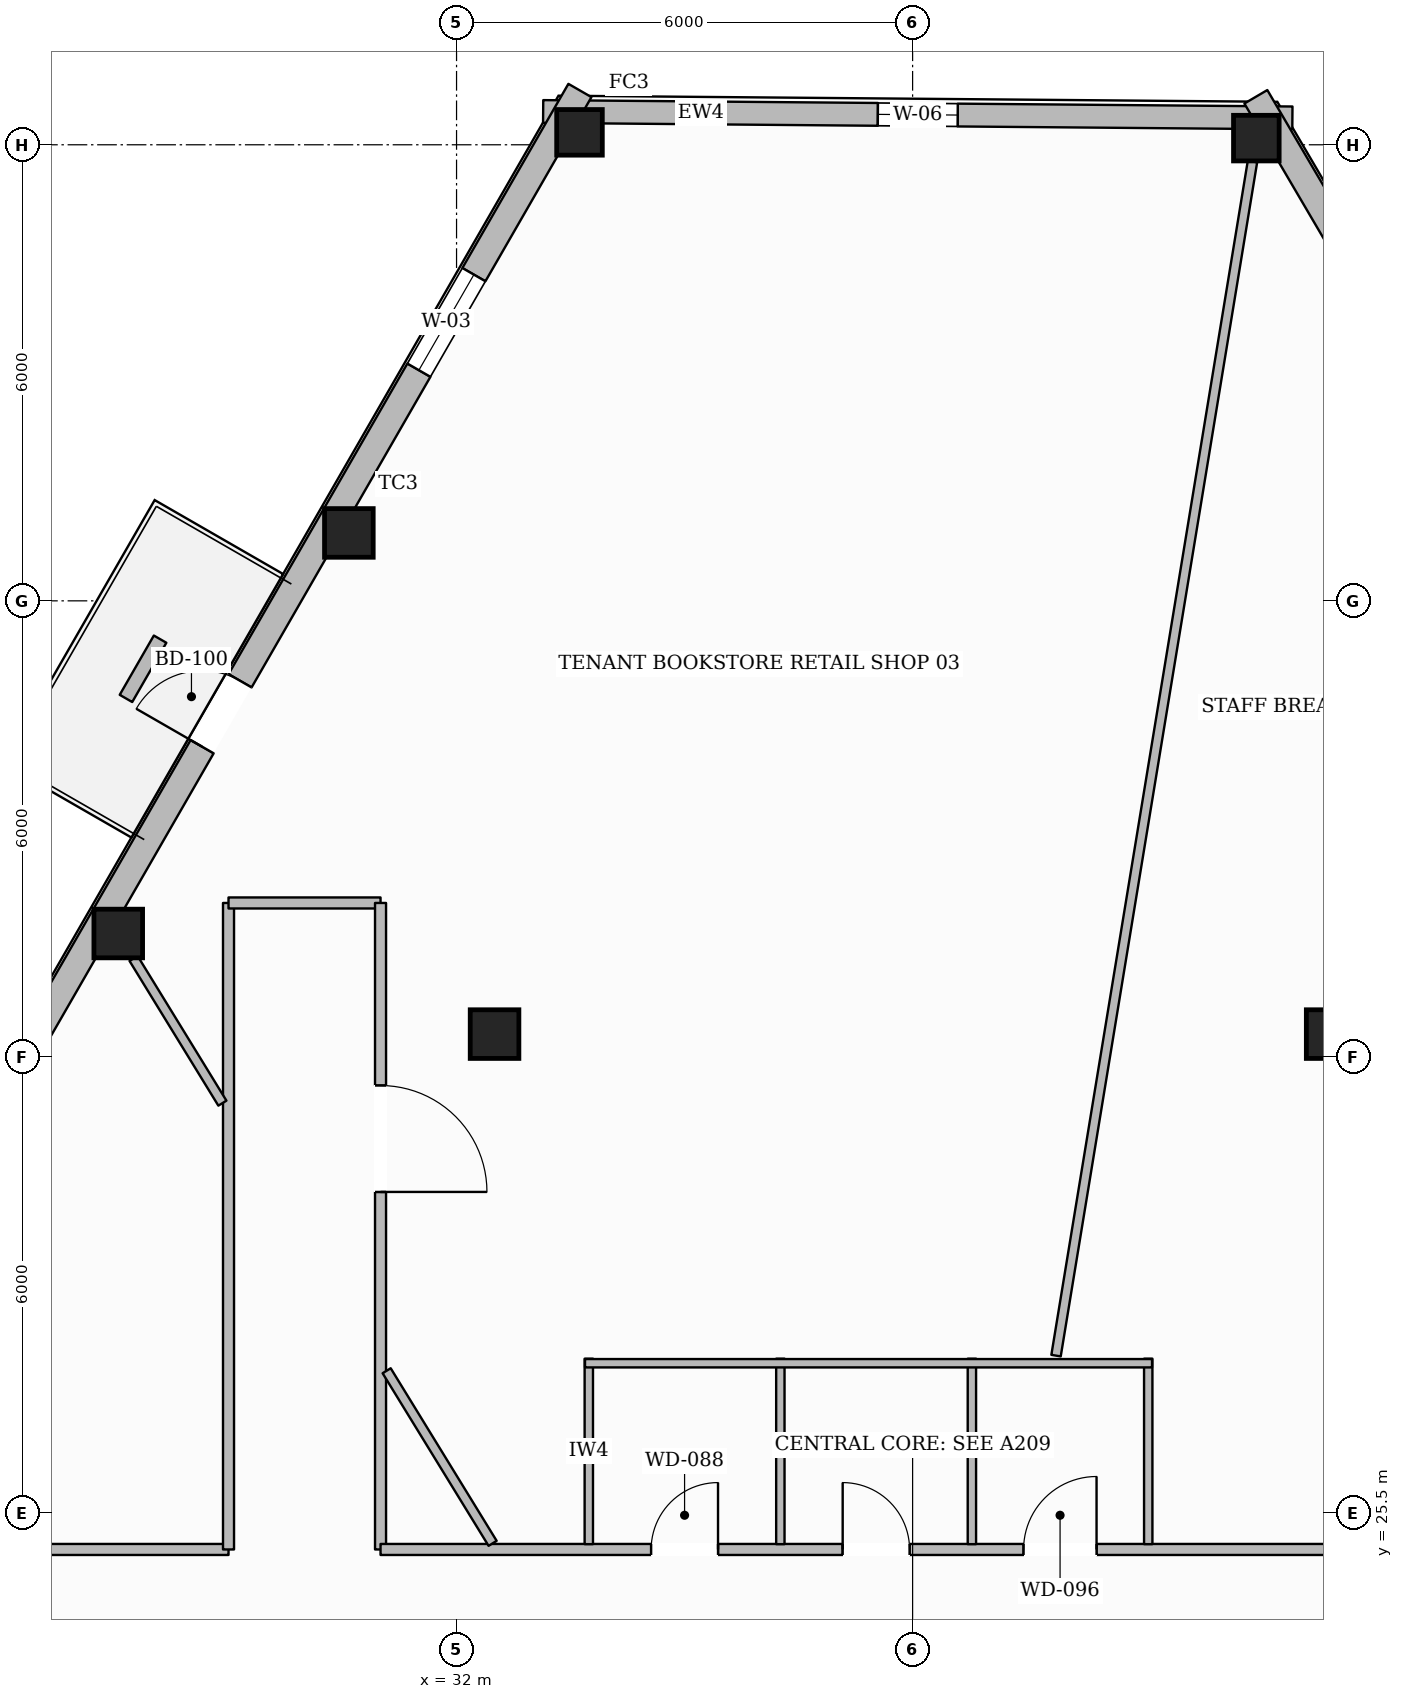
"""IFC4 building model, lengths in metres.
Left out: names, types, materials, properties, quantities, classifications, styles, units other than length and angle.
Written with IfcOpenShell. Run it as: python <this file> out.ifc"""

import sys

from ifc_helpers import new_model, si_unit, direction, frame, frame_2d, origin, origin_2d, place, context, subcontext, project, spatial, rectangle, hollow_rectangle, extrude, element, fill, save


model = new_model("IFC4")
c1 = context("Model", 3, precision=1e-05, world=origin(), true_north=direction((0.0, 1.0)))
c2 = subcontext(c1, "Body", "Model", "MODEL_VIEW")
j1 = project(units=[si_unit("LENGTHUNIT", "METRE"), si_unit("PLANEANGLEUNIT", "RADIAN")], contexts=[c1])
p1 = place(None, origin())
s1 = spatial("IfcSite", under=j1, at=p1, CompositionType="ELEMENT")
p2 = place(p1, origin())
s2 = spatial("IfcBuilding", under=s1, at=p2, CompositionType="ELEMENT")
p3 = place(p2, frame((0.0, 0.0, 191.95)))
s3 = spatial("IfcBuildingStorey", under=s2, at=p3, CompositionType="ELEMENT", Elevation=191.95)
p4 = place(p3, frame((33.617, 43.663, 0.0), z_axis=(0.0, 0.0, 1.0), x_axis=(1.0, 0.0, 0.0)))
e1 = element("IfcColumn", 1, at=p4, inside=s3, PredefinedType="COLUMN", context=c2, shape_type="SweptSolid", body=[
    extrude(hollow_rectangle(XDim=0.6, YDim=0.6, WallThickness=0.028, at=origin_2d()), origin(), (0.0, 0.0, 1.0), 3.6),
])
for number, where, z_axis, x_axis in (
    (2, (30.583, 38.393, 0.0), (0.0, 0.0, 1.0), (1.0, 0.0, 0.0)),
    (3, (27.549, 33.123, 0.0), (0.0, 0.0, 1.0), (1.0, 0.0, 0.0)),
):
    element("IfcColumn", number, at=place(p3, frame(where, z_axis=z_axis, x_axis=x_axis)), inside=s3, PredefinedType="COLUMN", context=c2, shape_type="SweptSolid", body=[
        extrude(hollow_rectangle(XDim=0.64, YDim=0.64, WallThickness=0.028, at=origin_2d()), origin(), (0.0, 0.0, 1.0), 3.6),
    ])
p5 = place(p3, frame((42.522, 43.587, 0.0), z_axis=(0.0, 0.0, 1.0), x_axis=(1.0, 0.0, 0.0)))
e4 = element("IfcColumn", 4, at=p5, inside=s3, PredefinedType="COLUMN", context=c2, shape_type="SweptSolid", body=[
    extrude(hollow_rectangle(XDim=0.6, YDim=0.6, WallThickness=0.028, at=origin_2d()), origin(), (0.0, 0.0, 1.0), 3.6),
])
for number, where, z_axis, x_axis in (
    (5, (32.5, 31.8, 0.0), (0.0, 0.0, 1.0), (1.0, 0.0, 0.0)),
    (6, (43.5, 31.8, 0.0), (0.0, 0.0, 1.0), (1.0, 0.0, 0.0)),
):
    element("IfcColumn", number, at=place(p3, frame(where, z_axis=z_axis, x_axis=x_axis)), inside=s3, PredefinedType="COLUMN", context=c2, shape_type="SweptSolid", body=[
        extrude(hollow_rectangle(XDim=0.64, YDim=0.64, WallThickness=0.028, at=origin_2d()), origin(), (0.0, 0.0, 1.0), 3.6),
    ])
p6 = place(p3, frame((33.139, 43.938, 0.0), z_axis=(0.0, 0.0, 1.0), x_axis=(0.999963705721, -0.008519814607, 0.0)))
e7 = element("IfcWall", 7, at=p6, inside=s3, PredefinedType="STANDARD", context=c2, shape_type="SweptSolid", body=[
    extrude(rectangle(XDim=9.857, YDim=0.3, at=frame_2d((4.929, 0.0))), origin(), (0.0, 0.0, 1.0), 3.132),
])
p7 = place(p6, frame((4.404, 0.0, 0.65)))
e8 = element("IfcOpeningElement", 8, at=p7, cuts=e7, PredefinedType="OPENING", context=c2, shape_type="SweptSolid", body=[
    extrude(rectangle(XDim=1.05, YDim=1.7, at=frame_2d((0.525, 0.85))), frame((0.0, 0.16, 0.0), z_axis=(0.0, -1.0, 0.0), x_axis=(1.0, 0.0, 0.0)), (0.0, 0.0, 1.0), 0.32),
])
p8 = place(p3, frame((14.94, 11.763, 0.0), z_axis=(0.0, 0.0, 1.0), x_axis=(0.498943522518, 0.866634502739, 0.0)))
e9 = element("IfcWall", 9, at=p8, inside=s3, PredefinedType="STANDARD", context=c2, shape_type="SweptSolid", body=[
    extrude(rectangle(XDim=37.445, YDim=0.35, at=frame_2d((18.723, 0.0))), origin(), (0.0, 0.0, 1.0), 3.132),
])
p9 = place(p8, frame((27.484, 0.0, 0.0)))
e10 = element("IfcOpeningElement", 10, at=p9, cuts=e9, PredefinedType="OPENING", context=c2, shape_type="SweptSolid", body=[
    extrude(rectangle(XDim=1.0, YDim=2.2, at=frame_2d((0.5, 1.1))), frame((0.0, 0.185, 0.0), z_axis=(0.0, -1.0, 0.0), x_axis=(1.0, 0.0, 0.0)), (0.0, 0.0, 1.0), 0.37),
])
p10 = place(p8, frame((33.2, 0.0, 0.65)))
e11 = element("IfcOpeningElement", 11, at=p10, cuts=e9, PredefinedType="OPENING", context=c2, shape_type="SweptSolid", body=[
    extrude(rectangle(XDim=1.45, YDim=1.75, at=frame_2d((0.725, 0.875))), frame((0.0, 0.185, 0.0), z_axis=(0.0, -1.0, 0.0), x_axis=(1.0, 0.0, 0.0)), (0.0, 0.0, 1.0), 0.37),
])
p11 = place(p8, frame((21.038, 0.0, 0.65)))
e12 = element("IfcOpeningElement", 12, at=p11, cuts=e9, PredefinedType="OPENING", context=c2, shape_type="SweptSolid", body=[
    extrude(rectangle(XDim=1.45, YDim=1.75, at=frame_2d((0.725, 0.875))), frame((0.0, 0.185, 0.0), z_axis=(0.0, -1.0, 0.0), x_axis=(1.0, 0.0, 0.0)), (0.0, 0.0, 1.0), 0.37),
])
p12 = place(p8, frame((8.875, 0.0, 0.65)))
e13 = element("IfcOpeningElement", 13, at=p12, cuts=e9, PredefinedType="OPENING", context=c2, shape_type="SweptSolid", body=[
    extrude(rectangle(XDim=1.45, YDim=1.75, at=frame_2d((0.725, 0.875))), frame((0.0, 0.185, 0.0), z_axis=(0.0, -1.0, 0.0), x_axis=(1.0, 0.0, 0.0)), (0.0, 0.0, 1.0), 0.37),
])
p13 = place(p8, frame((2.795, 0.0, 0.65)))
e14 = element("IfcOpeningElement", 14, at=p13, cuts=e9, PredefinedType="OPENING", context=c2, shape_type="SweptSolid", body=[
    extrude(rectangle(XDim=1.45, YDim=1.75, at=frame_2d((0.725, 0.875))), frame((0.0, 0.185, 0.0), z_axis=(0.0, -1.0, 0.0), x_axis=(1.0, 0.0, 0.0)), (0.0, 0.0, 1.0), 0.37),
])
p14 = place(p3, frame((42.516, 44.131, 0.0), z_axis=(0.0, 0.0, 1.0), x_axis=(0.506310158323, -0.862351450152, 0.0)))
e15 = element("IfcWall", 15, at=p14, inside=s3, PredefinedType="STANDARD", context=c2, shape_type="SweptSolid", body=[
    extrude(rectangle(XDim=38.0, YDim=0.35, at=frame_2d((19.0, 0.0))), origin(), (0.0, 0.0, 1.0), 3.132),
])
p15 = place(p14, frame((33.708, 0.0, 0.65)))
e16 = element("IfcOpeningElement", 16, at=p15, cuts=e15, PredefinedType="OPENING", context=c2, shape_type="SweptSolid", body=[
    extrude(rectangle(XDim=1.45, YDim=1.75, at=frame_2d((0.725, 0.875))), frame((0.0, 0.185, 0.0), z_axis=(0.0, -1.0, 0.0), x_axis=(1.0, 0.0, 0.0)), (0.0, 0.0, 1.0), 0.37),
])
p16 = place(p14, frame((27.534, 0.0, 0.65)))
e17 = element("IfcOpeningElement", 17, at=p16, cuts=e15, PredefinedType="OPENING", context=c2, shape_type="SweptSolid", body=[
    extrude(rectangle(XDim=1.45, YDim=1.75, at=frame_2d((0.725, 0.875))), frame((0.0, 0.185, 0.0), z_axis=(0.0, -1.0, 0.0), x_axis=(1.0, 0.0, 0.0)), (0.0, 0.0, 1.0), 0.37),
])
p17 = place(p14, frame((21.359, 0.0, 0.65)))
e18 = element("IfcOpeningElement", 18, at=p17, cuts=e15, PredefinedType="OPENING", context=c2, shape_type="SweptSolid", body=[
    extrude(rectangle(XDim=1.45, YDim=1.75, at=frame_2d((0.725, 0.875))), frame((0.0, 0.185, 0.0), z_axis=(0.0, -1.0, 0.0), x_axis=(1.0, 0.0, 0.0)), (0.0, 0.0, 1.0), 0.37),
])
p18 = place(p14, frame((9.009, 0.0, 0.65)))
e19 = element("IfcOpeningElement", 19, at=p18, cuts=e15, PredefinedType="OPENING", context=c2, shape_type="SweptSolid", body=[
    extrude(rectangle(XDim=1.45, YDim=1.75, at=frame_2d((0.725, 0.875))), frame((0.0, 0.185, 0.0), z_axis=(0.0, -1.0, 0.0), x_axis=(1.0, 0.0, 0.0)), (0.0, 0.0, 1.0), 0.37),
])
p19 = place(p14, frame((2.834, 0.0, 0.65)))
e20 = element("IfcOpeningElement", 20, at=p19, cuts=e15, PredefinedType="OPENING", context=c2, shape_type="SweptSolid", body=[
    extrude(rectangle(XDim=1.45, YDim=1.75, at=frame_2d((0.725, 0.875))), frame((0.0, 0.185, 0.0), z_axis=(0.0, -1.0, 0.0), x_axis=(1.0, 0.0, 0.0)), (0.0, 0.0, 1.0), 0.37),
])
p20 = place(p3, frame((28.1, 36.996, 0.0), z_axis=(0.0, 0.0, 1.0), x_axis=(-0.499057033185, -0.866569141862, 0.0)))
e21 = element("IfcWall", 21, at=p20, inside=s3, PredefinedType="USERDEFINED", context=c2, shape_type="SweptSolid", body=[
    extrude(rectangle(XDim=0.9, YDim=0.19, at=frame_2d((0.45, 0.0))), origin(), (0.0, 0.0, 1.0), 0.5),
])
p21 = place(p3, frame((26.06, 25.02, 0.0), z_axis=(0.0, 0.0, 1.0), x_axis=(1.0, 0.0, 0.0)))
e22 = element("IfcWall", 22, at=p21, inside=s3, PredefinedType="PARTITIONING", context=c2, shape_type="SweptSolid", body=[
    extrude(rectangle(XDim=2.94, YDim=0.145, at=frame_2d((1.47, 0.0))), origin(), (0.0, 0.0, 1.0), 3.6),
])
p22 = place(p3, frame((29.0, 25.02, 0.0), z_axis=(0.0, 0.0, 1.0), x_axis=(0.0, 1.0, 0.0)))
e23 = element("IfcWall", 23, at=p22, inside=s3, PredefinedType="PARTITIONING", context=c2, shape_type="SweptSolid", body=[
    extrude(rectangle(XDim=8.505, YDim=0.145, at=frame_2d((4.253, 0.0))), origin(), (0.0, 0.0, 1.0), 3.6),
])
p23 = place(p3, frame((29.0, 33.525, 0.0), z_axis=(0.0, 0.0, 1.0), x_axis=(1.0, 0.0, 0.0)))
e24 = element("IfcWall", 24, at=p23, inside=s3, PredefinedType="PARTITIONING", context=c2, shape_type="SweptSolid", body=[
    extrude(rectangle(XDim=2.0, YDim=0.145, at=frame_2d((1.0, 0.0))), origin(), (0.0, 0.0, 1.0), 3.6),
])
p24 = place(p3, frame((31.0, 33.525, 0.0), z_axis=(0.0, 0.0, 1.0), x_axis=(0.0, -1.0, 0.0)))
e25 = element("IfcWall", 25, at=p24, inside=s3, PredefinedType="PARTITIONING", context=c2, shape_type="SweptSolid", body=[
    extrude(rectangle(XDim=8.505, YDim=0.145, at=frame_2d((4.253, 0.0))), origin(), (0.0, 0.0, 1.0), 3.6),
])
p25 = place(p24, frame((2.402, 0.0, 0.0)))
e26 = element("IfcOpeningElement", 26, at=p25, cuts=e25, PredefinedType="OPENING", context=c2, shape_type="SweptSolid", body=[
    extrude(rectangle(XDim=1.4, YDim=2.2, at=frame_2d((0.7, 1.1))), frame((0.0, 0.083, 0.0), z_axis=(0.0, -1.0, 0.0), x_axis=(1.0, 0.0, 0.0)), (0.0, 0.0, 1.0), 0.165),
])
p26 = place(p3, frame((31.0, 25.02, 0.0), z_axis=(0.0, 0.0, 1.0), x_axis=(1.0, 0.0, 0.0)))
e27 = element("IfcWall", 27, at=p26, inside=s3, PredefinedType="PARTITIONING", context=c2, shape_type="SweptSolid", body=[
    extrude(rectangle(XDim=14.0, YDim=0.145, at=frame_2d((7.0, 0.0))), origin(), (0.0, 0.0, 1.0), 3.6),
])
p27 = place(p26, frame((3.56, 0.0, 0.0)))
e28 = element("IfcOpeningElement", 28, at=p27, cuts=e27, PredefinedType="OPENING", context=c2, shape_type="SweptSolid", body=[
    extrude(rectangle(XDim=0.88, YDim=2.1, at=frame_2d((0.44, 1.05))), frame((0.0, 0.083, 0.0), z_axis=(0.0, -1.0, 0.0), x_axis=(1.0, 0.0, 0.0)), (0.0, 0.0, 1.0), 0.165),
])
p28 = place(p26, frame((6.08, 0.0, 0.0)))
e29 = element("IfcOpeningElement", 29, at=p28, cuts=e27, PredefinedType="OPENING", context=c2, shape_type="SweptSolid", body=[
    extrude(rectangle(XDim=0.88, YDim=2.1, at=frame_2d((0.44, 1.05))), frame((0.0, 0.083, 0.0), z_axis=(0.0, -1.0, 0.0), x_axis=(1.0, 0.0, 0.0)), (0.0, 0.0, 1.0), 0.165),
])
p29 = place(p26, frame((8.46, 0.0, 0.0)))
e30 = element("IfcOpeningElement", 30, at=p29, cuts=e27, PredefinedType="OPENING", context=c2, shape_type="SweptSolid", body=[
    extrude(rectangle(XDim=0.96, YDim=2.1, at=frame_2d((0.48, 1.05))), frame((0.0, 0.083, 0.0), z_axis=(0.0, -1.0, 0.0), x_axis=(1.0, 0.0, 0.0)), (0.0, 0.0, 1.0), 0.165),
])
p30 = place(p3, frame((33.74, 25.09, 0.0), z_axis=(0.0, 0.0, 1.0), x_axis=(0.0, 1.0, 0.0)))
e31 = element("IfcWall", 31, at=p30, inside=s3, PredefinedType="PLUMBINGWALL", context=c2, shape_type="SweptSolid", body=[
    extrude(rectangle(XDim=2.44, YDim=0.11, at=frame_2d((1.22, 0.0))), origin(), (0.0, 0.0, 1.0), 3.141),
])
for number, where, z_axis, x_axis in (
    (32, (36.26, 25.09, 0.0), (0.0, 0.0, 1.0), (0.0, 1.0, 0.0)),
    (33, (38.78, 25.09, 0.0), (0.0, 0.0, 1.0), (0.0, 1.0, 0.0)),
    (34, (41.1, 25.09, 0.0), (0.0, 0.0, 1.0), (0.0, 1.0, 0.0)),
):
    element("IfcWall", number, at=place(p3, frame(where, z_axis=z_axis, x_axis=x_axis)), inside=s3, PredefinedType="PLUMBINGWALL", context=c2, shape_type="SweptSolid", body=[
        extrude(rectangle(XDim=2.44, YDim=0.11, at=frame_2d((1.22, 0.0))), origin(), (0.0, 0.0, 1.0), 3.6),
    ])
p31 = place(p3, frame((33.69, 27.47, 0.0), z_axis=(0.0, 0.0, 1.0), x_axis=(1.0, 0.0, 0.0)))
e35 = element("IfcWall", 35, at=p31, inside=s3, PredefinedType="PLUMBINGWALL", context=c2, shape_type="SweptSolid", body=[
    extrude(rectangle(XDim=7.46, YDim=0.11, at=frame_2d((3.73, 0.0))), origin(), (0.0, 0.0, 1.0), 3.6),
])
p32 = place(p3, frame((39.887, 27.57, 0.0), z_axis=(0.0, 0.0, 1.0), x_axis=(0.162334640523, 0.986735762241, 0.0)))
e36 = element("IfcWall", 36, at=p32, inside=s3, PredefinedType="PARTITIONING", context=c2, shape_type="SweptSolid", body=[
    extrude(rectangle(XDim=15.921, YDim=0.125, at=frame_2d((7.96, 0.0))), origin(), (0.0, 0.0, 1.0), 3.141),
])
p33 = place(p3, frame((32.475, 25.101, 0.0), z_axis=(0.0, 0.0, 1.0), x_axis=(-0.52318715373, 0.852217813808, 0.0)))
e37 = element("IfcWall", 37, at=p33, inside=s3, PredefinedType="PARTITIONING", context=c2, shape_type="SweptSolid", body=[
    extrude(rectangle(XDim=2.665, YDim=0.125, at=frame_2d((1.332, 0.0))), origin(), (0.0, 0.0, 1.0), 3.6),
])
p34 = place(p3, frame((28.919, 30.892, 0.0), z_axis=(0.0, 0.0, 1.0), x_axis=(-0.523164171822, 0.852231922262, 0.0)))
e38 = element("IfcWall", 38, at=p34, inside=s3, PredefinedType="PARTITIONING", context=c2, shape_type="SweptSolid", body=[
    extrude(rectangle(XDim=2.234, YDim=0.125, at=frame_2d((1.117, 0.0))), origin(), (0.0, 0.0, 1.0), 3.6),
])
p35 = place(p9, origin())
e39 = element("IfcDoor", 39, at=p35, inside=s3, OperationType="SINGLE_SWING_LEFT", PredefinedType="DOOR", context=c2, shape_type="SweptSolid", body=[
    extrude(rectangle(XDim=1.0, YDim=2.2, at=frame_2d((0.5, 1.1))), frame((0.0, 0.025, 0.0), z_axis=(0.0, -1.0, 0.0), x_axis=(1.0, 0.0, 0.0)), (0.0, 0.0, 1.0), 0.05),
])
fill(e10, e39)
p36 = place(p10, origin())
e40 = element("IfcWindow", 40, at=p36, inside=s3, PartitioningType="SINGLE_PANEL", PredefinedType="WINDOW", context=c2, shape_type="SweptSolid", body=[
    extrude(rectangle(XDim=1.45, YDim=1.75, at=frame_2d((0.725, 0.875))), frame((0.0, 0.03, 0.0), z_axis=(0.0, -1.0, 0.0), x_axis=(1.0, 0.0, 0.0)), (0.0, 0.0, 1.0), 0.06),
])
fill(e11, e40)
p37 = place(p7, origin())
e41 = element("IfcWindow", 41, at=p37, inside=s3, PartitioningType="SINGLE_PANEL", PredefinedType="WINDOW", context=c2, shape_type="SweptSolid", body=[
    extrude(rectangle(XDim=1.05, YDim=1.7, at=frame_2d((0.525, 0.85))), frame((0.0, 0.03, 0.0), z_axis=(0.0, -1.0, 0.0), x_axis=(1.0, 0.0, 0.0)), (0.0, 0.0, 1.0), 0.06),
])
fill(e8, e41)
p38 = place(p27, origin())
e42 = element("IfcDoor", 42, at=p38, inside=s3, OperationType="SINGLE_SWING_RIGHT", PredefinedType="DOOR", context=c2, shape_type="SweptSolid", body=[
    extrude(rectangle(XDim=0.88, YDim=2.1, at=frame_2d((0.44, 1.05))), frame((0.0, 0.025, 0.0), z_axis=(0.0, -1.0, 0.0), x_axis=(1.0, 0.0, 0.0)), (0.0, 0.0, 1.0), 0.05),
])
fill(e28, e42)
p39 = place(p28, origin())
e43 = element("IfcDoor", 43, at=p39, inside=s3, OperationType="SINGLE_SWING_LEFT", PredefinedType="DOOR", context=c2, shape_type="SweptSolid", body=[
    extrude(rectangle(XDim=0.88, YDim=2.1, at=frame_2d((0.44, 1.05))), frame((0.0, 0.025, 0.0), z_axis=(0.0, -1.0, 0.0), x_axis=(1.0, 0.0, 0.0)), (0.0, 0.0, 1.0), 0.05),
])
fill(e29, e43)
p40 = place(p29, origin())
e44 = element("IfcDoor", 44, at=p40, inside=s3, OperationType="SINGLE_SWING_RIGHT", PredefinedType="DOOR", context=c2, shape_type="SweptSolid", body=[
    extrude(rectangle(XDim=0.96, YDim=2.1, at=frame_2d((0.48, 1.05))), frame((0.0, 0.025, 0.0), z_axis=(0.0, -1.0, 0.0), x_axis=(1.0, 0.0, 0.0)), (0.0, 0.0, 1.0), 0.05),
])
fill(e30, e44)
p41 = place(p25, origin())
e45 = element("IfcDoor", 45, at=p41, inside=s3, OperationType="SINGLE_SWING_RIGHT", PredefinedType="DOOR", context=c2, shape_type="SweptSolid", body=[
    extrude(rectangle(XDim=1.4, YDim=2.2, at=frame_2d((0.7, 1.1))), frame((0.0, 0.025, 0.0), z_axis=(0.0, -1.0, 0.0), x_axis=(1.0, 0.0, 0.0)), (0.0, 0.0, 1.0), 0.05),
])
fill(e26, e45)
save(model, sys.argv[1])
